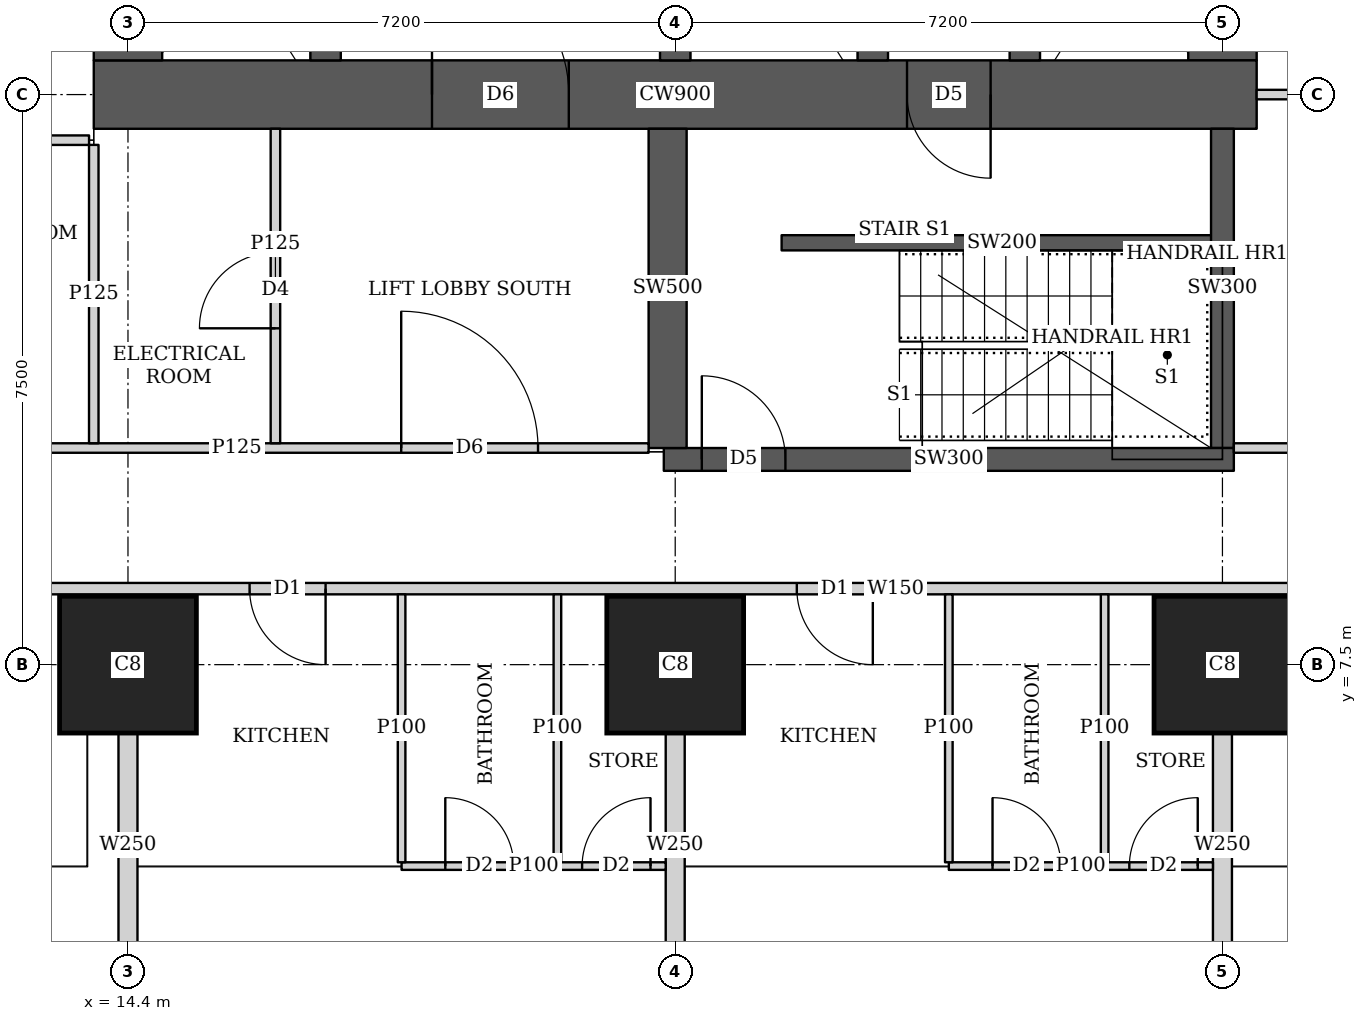
"""IFC4 building model, lengths in metres.
Left out: names, types, materials, properties, quantities, classifications, styles, units other than length and angle.
Written with IfcOpenShell. Run it as: python <this file> out.ifc"""

import sys

from ifc_helpers import new_model, si_unit, direction, frame, frame_2d, origin, origin_2d, place, context, subcontext, project, spatial, rectangle, extrude, element, fill, save


model = new_model("IFC4")
c1 = context("Model", 3, precision=1e-05, world=origin(), true_north=direction((0.0, 1.0)))
c2 = subcontext(c1, "Body", "Model", "MODEL_VIEW")
j1 = project(units=[si_unit("LENGTHUNIT", "METRE"), si_unit("PLANEANGLEUNIT", "RADIAN")], contexts=[c1])
p1 = place(None, origin())
s1 = spatial("IfcSite", under=j1, at=p1, CompositionType="ELEMENT")
p2 = place(p1, origin())
s2 = spatial("IfcBuilding", under=s1, at=p2, CompositionType="ELEMENT")
p3 = place(p2, frame((0.0, 0.0, 42.5)))
s3 = spatial("IfcBuildingStorey", under=s2, at=p3, CompositionType="ELEMENT", Elevation=42.5)
for number, where, z_axis, x_axis in (
    (1, (14.4, 7.5, 0.0), (0.0, 0.0, 1.0), (1.0, 0.0, 0.0)),
    (2, (21.6, 7.5, 0.0), (0.0, 0.0, 1.0), (1.0, 0.0, 0.0)),
    (3, (28.8, 7.5, 0.0), (0.0, 0.0, 1.0), (1.0, 0.0, 0.0)),
):
    element("IfcColumn", number, at=place(p3, frame(where, z_axis=z_axis, x_axis=x_axis)), inside=s3, PredefinedType="COLUMN", context=c2, shape_type="SweptSolid", body=[
        extrude(rectangle(XDim=1.8, YDim=1.8, at=origin_2d()), origin(), (0.0, 0.0, 1.0), 3.75),
    ])
p4 = place(p3, frame((13.95, 15.0, 0.0), z_axis=(0.0, 0.0, 1.0), x_axis=(1.0, 0.0, 0.0)))
e4 = element("IfcWall", 4, at=p4, inside=s3, PredefinedType="SHEAR", context=c2, shape_type="SweptSolid", body=[
    extrude(rectangle(XDim=15.3, YDim=0.9, at=frame_2d((7.65, 0.0))), origin(), (0.0, 0.0, 1.0), 3.75),
])
p5 = place(p4, frame((4.45, 0.0, 0.0)))
e5 = element("IfcOpeningElement", 5, at=p5, cuts=e4, PredefinedType="OPENING", context=c2, shape_type="SweptSolid", body=[
    extrude(rectangle(XDim=1.8, YDim=2.1, at=frame_2d((0.9, 1.05))), frame((0.0, 0.46, 0.0), z_axis=(0.0, -1.0, 0.0), x_axis=(1.0, 0.0, 0.0)), (0.0, 0.0, 1.0), 0.92),
])
p6 = place(p4, frame((10.7, 0.0, 0.0)))
e6 = element("IfcOpeningElement", 6, at=p6, cuts=e4, PredefinedType="OPENING", context=c2, shape_type="SweptSolid", body=[
    extrude(rectangle(XDim=1.1, YDim=2.1, at=frame_2d((0.55, 1.05))), frame((0.0, 0.46, 0.0), z_axis=(0.0, -1.0, 0.0), x_axis=(1.0, 0.0, 0.0)), (0.0, 0.0, 1.0), 0.92),
])
for number, where, z_axis, x_axis in (
    (7, (14.4, 15.45, 0.0), (0.0, 0.0, 1.0), (0.0, 1.0, 0.0)),
    (8, (28.8, 15.45, 0.0), (0.0, 0.0, 1.0), (0.0, 1.0, 0.0)),
):
    element("IfcWall", number, at=place(p3, frame(where, z_axis=z_axis, x_axis=x_axis)), inside=s3, PredefinedType="SHEAR", context=c2, shape_type="SweptSolid", body=[
        extrude(rectangle(XDim=14.1, YDim=0.9, at=frame_2d((7.05, 0.0))), origin(), (0.0, 0.0, 1.0), 3.75),
    ])
p7 = place(p3, frame((17.0, 15.45, 0.0), z_axis=(0.0, 0.0, 1.0), x_axis=(0.0, 1.0, 0.0)))
e9 = element("IfcWall", 9, at=p7, inside=s3, PredefinedType="SHEAR", context=c2, shape_type="SweptSolid", body=[
    extrude(rectangle(XDim=14.1, YDim=0.4, at=frame_2d((7.05, 0.0))), origin(), (0.0, 0.0, 1.0), 3.75),
])
p8 = place(p7, frame((0.875, 0.0, 0.0)))
e10 = element("IfcOpeningElement", 10, at=p8, cuts=e9, PredefinedType="OPENING", context=c2, shape_type="SweptSolid", body=[
    extrude(rectangle(XDim=1.1, YDim=2.1, at=frame_2d((0.55, 1.05))), frame((0.0, 0.21, 0.0), z_axis=(0.0, -1.0, 0.0), x_axis=(1.0, 0.0, 0.0)), (0.0, 0.0, 1.0), 0.42),
])
p9 = place(p7, frame((4.625, 0.0, 0.0)))
e11 = element("IfcOpeningElement", 11, at=p9, cuts=e9, PredefinedType="OPENING", context=c2, shape_type="SweptSolid", body=[
    extrude(rectangle(XDim=1.1, YDim=2.1, at=frame_2d((0.55, 1.05))), frame((0.0, 0.21, 0.0), z_axis=(0.0, -1.0, 0.0), x_axis=(1.0, 0.0, 0.0)), (0.0, 0.0, 1.0), 0.42),
])
p10 = place(p7, frame((8.375, 0.0, 0.0)))
e12 = element("IfcOpeningElement", 12, at=p10, cuts=e9, PredefinedType="OPENING", context=c2, shape_type="SweptSolid", body=[
    extrude(rectangle(XDim=1.1, YDim=2.1, at=frame_2d((0.55, 1.05))), frame((0.0, 0.21, 0.0), z_axis=(0.0, -1.0, 0.0), x_axis=(1.0, 0.0, 0.0)), (0.0, 0.0, 1.0), 0.42),
])
p11 = place(p7, frame((12.125, 0.0, 0.0)))
e13 = element("IfcOpeningElement", 13, at=p11, cuts=e9, PredefinedType="OPENING", context=c2, shape_type="SweptSolid", body=[
    extrude(rectangle(XDim=1.1, YDim=2.1, at=frame_2d((0.55, 1.05))), frame((0.0, 0.21, 0.0), z_axis=(0.0, -1.0, 0.0), x_axis=(1.0, 0.0, 0.0)), (0.0, 0.0, 1.0), 0.42),
])
for number, where, z_axis, x_axis in (
    (14, (21.6, 15.45, 0.0), (0.0, 0.0, 1.0), (0.0, 1.0, 0.0)),
    (15, (24.2, 15.45, 0.0), (0.0, 0.0, 1.0), (0.0, 1.0, 0.0)),
):
    element("IfcWall", number, at=place(p3, frame(where, z_axis=z_axis, x_axis=x_axis)), inside=s3, PredefinedType="SHEAR", context=c2, shape_type="SweptSolid", body=[
        extrude(rectangle(XDim=14.1, YDim=0.4, at=frame_2d((7.05, 0.0))), origin(), (0.0, 0.0, 1.0), 3.75),
    ])
p12 = place(p3, frame((26.2, 15.45, 0.0), z_axis=(0.0, 0.0, 1.0), x_axis=(0.0, 1.0, 0.0)))
e16 = element("IfcWall", 16, at=p12, inside=s3, PredefinedType="SHEAR", context=c2, shape_type="SweptSolid", body=[
    extrude(rectangle(XDim=3.1, YDim=0.4, at=frame_2d((1.55, 0.0))), origin(), (0.0, 0.0, 1.0), 3.75),
])
p13 = place(p12, frame((0.825, 0.0, 0.0)))
e17 = element("IfcOpeningElement", 17, at=p13, cuts=e16, PredefinedType="OPENING", context=c2, shape_type="SweptSolid", body=[
    extrude(rectangle(XDim=1.2, YDim=2.1, at=frame_2d((0.6, 1.05))), frame((0.0, 0.21, 0.0), z_axis=(0.0, -1.0, 0.0), x_axis=(1.0, 0.0, 0.0)), (0.0, 0.0, 1.0), 0.42),
])
p14 = place(p3, frame((21.45, 10.2, 0.0), z_axis=(0.0, 0.0, 1.0), x_axis=(1.0, 0.0, 0.0)))
e18 = element("IfcWall", 18, at=p14, inside=s3, PredefinedType="SHEAR", context=c2, shape_type="SweptSolid", body=[
    extrude(rectangle(XDim=7.5, YDim=0.3, at=frame_2d((3.75, 0.0))), origin(), (0.0, 0.0, 1.0), 3.75),
])
p15 = place(p14, frame((0.5, 0.0, 0.0)))
e19 = element("IfcOpeningElement", 19, at=p15, cuts=e18, PredefinedType="OPENING", context=c2, shape_type="SweptSolid", body=[
    extrude(rectangle(XDim=1.1, YDim=2.1, at=frame_2d((0.55, 1.05))), frame((0.0, 0.16, 0.0), z_axis=(0.0, -1.0, 0.0), x_axis=(1.0, 0.0, 0.0)), (0.0, 0.0, 1.0), 0.32),
])
p16 = place(p3, frame((21.5, 10.35, 0.0), z_axis=(0.0, 0.0, 1.0), x_axis=(0.0, 1.0, 0.0)))
e20 = element("IfcWall", 20, at=p16, inside=s3, PredefinedType="SHEAR", context=c2, shape_type="SweptSolid", body=[
    extrude(rectangle(XDim=4.2, YDim=0.5, at=frame_2d((2.1, 0.0))), origin(), (0.0, 0.0, 1.0), 3.75),
])
p17 = place(p3, frame((28.8, 10.35, 0.0), z_axis=(0.0, 0.0, 1.0), x_axis=(0.0, 1.0, 0.0)))
e21 = element("IfcWall", 21, at=p17, inside=s3, PredefinedType="SHEAR", context=c2, shape_type="SweptSolid", body=[
    extrude(rectangle(XDim=4.2, YDim=0.3, at=frame_2d((2.1, 0.0))), origin(), (0.0, 0.0, 1.0), 3.75),
])
p18 = place(p3, frame((40.054, 8.5, 0.0), z_axis=(0.0, 0.0, 1.0), x_axis=(-1.0, 0.0, 0.0)))
e22 = element("IfcWall", 22, at=p18, inside=s3, PredefinedType="SOLIDWALL", context=c2, shape_type="SweptSolid", body=[
    extrude(rectangle(XDim=31.704, YDim=0.15, at=frame_2d((15.852, 0.0))), origin(), (0.0, 0.0, 1.0), 3.5),
])
p19 = place(p18, frame((27.321, 0.0, 0.0)))
e23 = element("IfcOpeningElement", 23, at=p19, cuts=e22, PredefinedType="OPENING", context=c2, shape_type="SweptSolid", body=[
    extrude(rectangle(XDim=1.0, YDim=2.1, at=frame_2d((0.5, 1.05))), frame((0.0, 0.085, 0.0), z_axis=(0.0, -1.0, 0.0), x_axis=(1.0, 0.0, 0.0)), (0.0, 0.0, 1.0), 0.17),
])
p20 = place(p18, frame((23.054, 0.0, 0.0)))
e24 = element("IfcOpeningElement", 24, at=p20, cuts=e22, PredefinedType="OPENING", context=c2, shape_type="SweptSolid", body=[
    extrude(rectangle(XDim=1.0, YDim=2.1, at=frame_2d((0.5, 1.05))), frame((0.0, 0.085, 0.0), z_axis=(0.0, -1.0, 0.0), x_axis=(1.0, 0.0, 0.0)), (0.0, 0.0, 1.0), 0.17),
])
p21 = place(p18, frame((15.854, 0.0, 0.0)))
e25 = element("IfcOpeningElement", 25, at=p21, cuts=e22, PredefinedType="OPENING", context=c2, shape_type="SweptSolid", body=[
    extrude(rectangle(XDim=1.0, YDim=2.1, at=frame_2d((0.5, 1.05))), frame((0.0, 0.085, 0.0), z_axis=(0.0, -1.0, 0.0), x_axis=(1.0, 0.0, 0.0)), (0.0, 0.0, 1.0), 0.17),
])
p22 = place(p18, frame((8.654, 0.0, 0.0)))
e26 = element("IfcOpeningElement", 26, at=p22, cuts=e22, PredefinedType="OPENING", context=c2, shape_type="SweptSolid", body=[
    extrude(rectangle(XDim=1.0, YDim=2.1, at=frame_2d((0.5, 1.05))), frame((0.0, 0.085, 0.0), z_axis=(0.0, -1.0, 0.0), x_axis=(1.0, 0.0, 0.0)), (0.0, 0.0, 1.0), 0.17),
])
p23 = place(p18, frame((0.15, 0.0, 0.0)))
e27 = element("IfcOpeningElement", 27, at=p23, cuts=e22, PredefinedType="OPENING", context=c2, shape_type="SweptSolid", body=[
    extrude(rectangle(XDim=1.0, YDim=2.1, at=frame_2d((0.5, 1.05))), frame((0.0, 0.085, 0.0), z_axis=(0.0, -1.0, 0.0), x_axis=(1.0, 0.0, 0.0)), (0.0, 0.0, 1.0), 0.17),
])
p24 = place(p3, frame((21.475, 4.85, 0.0), z_axis=(0.0, 0.0, 1.0), x_axis=(-1.0, 0.0, 0.0)))
e28 = element("IfcWall", 28, at=p24, inside=s3, PredefinedType="PARTITIONING", context=c2, shape_type="SweptSolid", body=[
    extrude(rectangle(XDim=3.475, YDim=0.1, at=frame_2d((1.738, 0.0))), origin(), (0.0, 0.0, 1.0), 3.5),
])
p25 = place(p24, frame((2.0, 0.0, 0.0)))
e29 = element("IfcOpeningElement", 29, at=p25, cuts=e28, PredefinedType="OPENING", context=c2, shape_type="SweptSolid", body=[
    extrude(rectangle(XDim=0.9, YDim=2.1, at=frame_2d((0.45, 1.05))), frame((0.0, 0.06, 0.0), z_axis=(0.0, -1.0, 0.0), x_axis=(1.0, 0.0, 0.0)), (0.0, 0.0, 1.0), 0.12),
])
p26 = place(p24, frame((0.2, 0.0, 0.0)))
e30 = element("IfcOpeningElement", 30, at=p26, cuts=e28, PredefinedType="OPENING", context=c2, shape_type="SweptSolid", body=[
    extrude(rectangle(XDim=0.9, YDim=2.1, at=frame_2d((0.45, 1.05))), frame((0.0, 0.06, 0.0), z_axis=(0.0, -1.0, 0.0), x_axis=(1.0, 0.0, 0.0)), (0.0, 0.0, 1.0), 0.12),
])
for number, where, z_axis, x_axis in (
    (31, (18.0, 4.9, 0.0), (0.0, 0.0, 1.0), (0.0, 1.0, 0.0)),
    (32, (20.05, 4.9, 0.0), (0.0, 0.0, 1.0), (0.0, 1.0, 0.0)),
):
    element("IfcWall", number, at=place(p3, frame(where, z_axis=z_axis, x_axis=x_axis)), inside=s3, PredefinedType="PARTITIONING", context=c2, shape_type="SweptSolid", body=[
        extrude(rectangle(XDim=3.525, YDim=0.1, at=frame_2d((1.763, 0.0))), origin(), (0.0, 0.0, 1.0), 3.5),
    ])
p27 = place(p3, frame((14.4, 3.65, 0.0), z_axis=(0.0, 0.0, 1.0), x_axis=(0.0, 1.0, 0.0)))
e33 = element("IfcWall", 33, at=p27, inside=s3, PredefinedType="SOLIDWALL", context=c2, shape_type="SweptSolid", body=[
    extrude(rectangle(XDim=2.949, YDim=0.25, at=frame_2d((1.475, 0.0))), origin(), (0.0, 0.0, 1.0), 3.5),
])
p28 = place(p3, frame((28.675, 4.85, 0.0), z_axis=(0.0, 0.0, 1.0), x_axis=(-1.0, 0.0, 0.0)))
e34 = element("IfcWall", 34, at=p28, inside=s3, PredefinedType="PARTITIONING", context=c2, shape_type="SweptSolid", body=[
    extrude(rectangle(XDim=3.475, YDim=0.1, at=frame_2d((1.738, 0.0))), origin(), (0.0, 0.0, 1.0), 3.5),
])
p29 = place(p28, frame((2.0, 0.0, 0.0)))
e35 = element("IfcOpeningElement", 35, at=p29, cuts=e34, PredefinedType="OPENING", context=c2, shape_type="SweptSolid", body=[
    extrude(rectangle(XDim=0.9, YDim=2.1, at=frame_2d((0.45, 1.05))), frame((0.0, 0.06, 0.0), z_axis=(0.0, -1.0, 0.0), x_axis=(1.0, 0.0, 0.0)), (0.0, 0.0, 1.0), 0.12),
])
p30 = place(p28, frame((0.2, 0.0, 0.0)))
e36 = element("IfcOpeningElement", 36, at=p30, cuts=e34, PredefinedType="OPENING", context=c2, shape_type="SweptSolid", body=[
    extrude(rectangle(XDim=0.9, YDim=2.1, at=frame_2d((0.45, 1.05))), frame((0.0, 0.06, 0.0), z_axis=(0.0, -1.0, 0.0), x_axis=(1.0, 0.0, 0.0)), (0.0, 0.0, 1.0), 0.12),
])
for number, where, z_axis, x_axis in (
    (37, (25.2, 4.9, 0.0), (0.0, 0.0, 1.0), (0.0, 1.0, 0.0)),
    (38, (27.25, 4.9, 0.0), (0.0, 0.0, 1.0), (0.0, 1.0, 0.0)),
):
    element("IfcWall", number, at=place(p3, frame(where, z_axis=z_axis, x_axis=x_axis)), inside=s3, PredefinedType="PARTITIONING", context=c2, shape_type="SweptSolid", body=[
        extrude(rectangle(XDim=3.525, YDim=0.1, at=frame_2d((1.763, 0.0))), origin(), (0.0, 0.0, 1.0), 3.5),
    ])
for number, where, z_axis, x_axis in (
    (39, (21.6, 3.65, 0.0), (0.0, 0.0, 1.0), (0.0, 1.0, 0.0)),
    (40, (28.8, 3.65, 0.0), (0.0, 0.0, 1.0), (0.0, 1.0, 0.0)),
):
    element("IfcWall", number, at=place(p3, frame(where, z_axis=z_axis, x_axis=x_axis)), inside=s3, PredefinedType="SOLIDWALL", context=c2, shape_type="SweptSolid", body=[
        extrude(rectangle(XDim=2.949, YDim=0.25, at=frame_2d((1.475, 0.0))), origin(), (0.0, 0.0, 1.0), 3.5),
    ])
p31 = place(p3, frame((10.413, 14.4, 0.0), z_axis=(0.0, 0.0, 1.0), x_axis=(1.0, 0.0, 0.0)))
e41 = element("IfcWall", 41, at=p31, inside=s3, PredefinedType="PARTITIONING", context=c2, shape_type="SweptSolid", body=[
    extrude(rectangle(XDim=3.475, YDim=0.125, at=frame_2d((1.737, 0.0))), origin(), (0.0, 0.0, 1.0), 3.5),
])
p32 = place(p3, frame((13.95, 10.413, 0.0), z_axis=(0.0, 0.0, 1.0), x_axis=(0.0, 1.0, 0.0)))
e42 = element("IfcWall", 42, at=p32, inside=s3, PredefinedType="PARTITIONING", context=c2, shape_type="SweptSolid", body=[
    extrude(rectangle(XDim=3.925, YDim=0.125, at=frame_2d((1.962, 0.0))), origin(), (0.0, 0.0, 1.0), 3.5),
])
p33 = place(p3, frame((10.413, 10.35, 0.0), z_axis=(0.0, 0.0, 1.0), x_axis=(1.0, 0.0, 0.0)))
e43 = element("IfcWall", 43, at=p33, inside=s3, PredefinedType="PARTITIONING", context=c2, shape_type="SweptSolid", body=[
    extrude(rectangle(XDim=10.837, YDim=0.125, at=frame_2d((5.418, 0.0))), origin(), (0.0, 0.0, 1.0), 3.5),
])
p34 = place(p33, frame((7.582, 0.0, 0.0)))
e44 = element("IfcOpeningElement", 44, at=p34, cuts=e43, PredefinedType="OPENING", context=c2, shape_type="SweptSolid", body=[
    extrude(rectangle(XDim=1.8, YDim=2.1, at=frame_2d((0.9, 1.05))), frame((0.0, 0.073, 0.0), z_axis=(0.0, -1.0, 0.0), x_axis=(1.0, 0.0, 0.0)), (0.0, 0.0, 1.0), 0.145),
])
p35 = place(p3, frame((16.34, 10.413, 0.0), z_axis=(0.0, 0.0, 1.0), x_axis=(0.0, 1.0, 0.0)))
e45 = element("IfcWall", 45, at=p35, inside=s3, PredefinedType="PARTITIONING", context=c2, shape_type="SweptSolid", body=[
    extrude(rectangle(XDim=4.137, YDim=0.125, at=frame_2d((2.068, 0.0))), origin(), (0.0, 0.0, 1.0), 3.5),
])
p36 = place(p35, frame((1.512, 0.0, 0.0)))
e46 = element("IfcOpeningElement", 46, at=p36, cuts=e45, PredefinedType="OPENING", context=c2, shape_type="SweptSolid", body=[
    extrude(rectangle(XDim=1.0, YDim=2.1, at=frame_2d((0.5, 1.05))), frame((0.0, 0.073, 0.0), z_axis=(0.0, -1.0, 0.0), x_axis=(1.0, 0.0, 0.0)), (0.0, 0.0, 1.0), 0.145),
])
p37 = place(p3, frame((28.95, 10.35, 0.0), z_axis=(0.0, 0.0, 1.0), x_axis=(1.0, 0.0, 0.0)))
e47 = element("IfcWall", 47, at=p37, inside=s3, PredefinedType="PARTITIONING", context=c2, shape_type="SweptSolid", body=[
    extrude(rectangle(XDim=8.886, YDim=0.125, at=frame_2d((4.443, 0.0))), origin(), (0.0, 0.0, 1.0), 3.5),
])
p38 = place(p3, frame((29.25, 15.0, 0.0), z_axis=(0.0, 0.0, 1.0), x_axis=(1.0, 0.0, 0.0)))
e48 = element("IfcWall", 48, at=p38, inside=s3, PredefinedType="PARTITIONING", context=c2, shape_type="SweptSolid", body=[
    extrude(rectangle(XDim=5.849, YDim=0.125, at=frame_2d((2.925, 0.0))), origin(), (0.0, 0.0, 1.0), 3.5),
])
p39 = place(p3, frame((23.0, 13.05, 0.0), z_axis=(0.0, 0.0, 1.0), x_axis=(1.0, 0.0, 0.0)))
e49 = element("IfcWall", 49, at=p39, inside=s3, PredefinedType="SHEAR", context=c2, shape_type="SweptSolid", body=[
    extrude(rectangle(XDim=5.8, YDim=0.2, at=frame_2d((2.9, 0.0))), origin(), (0.0, 0.0, 1.0), 3.75),
])
p40 = place(p25, origin())
e50 = element("IfcDoor", 50, at=p40, inside=s3, OperationType="SINGLE_SWING_LEFT", PredefinedType="DOOR", context=c2, shape_type="SweptSolid", body=[
    extrude(rectangle(XDim=0.9, YDim=2.1, at=frame_2d((0.45, 1.05))), frame((0.0, 0.025, 0.0), z_axis=(0.0, -1.0, 0.0), x_axis=(1.0, 0.0, 0.0)), (0.0, 0.0, 1.0), 0.05),
])
fill(e29, e50)
p41 = place(p26, origin())
e51 = element("IfcDoor", 51, at=p41, inside=s3, OperationType="SINGLE_SWING_RIGHT", PredefinedType="DOOR", context=c2, shape_type="SweptSolid", body=[
    extrude(rectangle(XDim=0.9, YDim=2.1, at=frame_2d((0.45, 1.05))), frame((0.0, 0.025, 0.0), z_axis=(0.0, -1.0, 0.0), x_axis=(1.0, 0.0, 0.0)), (0.0, 0.0, 1.0), 0.05),
])
fill(e30, e51)
p42 = place(p20, origin())
e52 = element("IfcDoor", 52, at=p42, inside=s3, OperationType="SINGLE_SWING_LEFT", PredefinedType="DOOR", context=c2, shape_type="SweptSolid", body=[
    extrude(rectangle(XDim=1.0, YDim=2.1, at=frame_2d((0.5, 1.05))), frame((0.0, 0.025, 0.0), z_axis=(0.0, -1.0, 0.0), x_axis=(1.0, 0.0, 0.0)), (0.0, 0.0, 1.0), 0.05),
])
fill(e24, e52)
p43 = place(p29, origin())
e53 = element("IfcDoor", 53, at=p43, inside=s3, OperationType="SINGLE_SWING_LEFT", PredefinedType="DOOR", context=c2, shape_type="SweptSolid", body=[
    extrude(rectangle(XDim=0.9, YDim=2.1, at=frame_2d((0.45, 1.05))), frame((0.0, 0.025, 0.0), z_axis=(0.0, -1.0, 0.0), x_axis=(1.0, 0.0, 0.0)), (0.0, 0.0, 1.0), 0.05),
])
fill(e35, e53)
p44 = place(p30, origin())
e54 = element("IfcDoor", 54, at=p44, inside=s3, OperationType="SINGLE_SWING_RIGHT", PredefinedType="DOOR", context=c2, shape_type="SweptSolid", body=[
    extrude(rectangle(XDim=0.9, YDim=2.1, at=frame_2d((0.45, 1.05))), frame((0.0, 0.025, 0.0), z_axis=(0.0, -1.0, 0.0), x_axis=(1.0, 0.0, 0.0)), (0.0, 0.0, 1.0), 0.05),
])
fill(e36, e54)
p45 = place(p21, origin())
e55 = element("IfcDoor", 55, at=p45, inside=s3, OperationType="SINGLE_SWING_LEFT", PredefinedType="DOOR", context=c2, shape_type="SweptSolid", body=[
    extrude(rectangle(XDim=1.0, YDim=2.1, at=frame_2d((0.5, 1.05))), frame((0.0, 0.025, 0.0), z_axis=(0.0, -1.0, 0.0), x_axis=(1.0, 0.0, 0.0)), (0.0, 0.0, 1.0), 0.05),
])
fill(e25, e55)
p46 = place(p36, origin())
e56 = element("IfcDoor", 56, at=p46, inside=s3, OperationType="SINGLE_SWING_LEFT", PredefinedType="DOOR", context=c2, shape_type="SweptSolid", body=[
    extrude(rectangle(XDim=1.0, YDim=2.1, at=frame_2d((0.5, 1.05))), frame((0.0, 0.025, 0.0), z_axis=(0.0, -1.0, 0.0), x_axis=(1.0, 0.0, 0.0)), (0.0, 0.0, 1.0), 0.05),
])
fill(e46, e56)
p47 = place(p34, origin())
e57 = element("IfcDoor", 57, at=p47, inside=s3, OperationType="DOUBLE_DOOR_SINGLE_SWING", PredefinedType="DOOR", context=c2, shape_type="SweptSolid", body=[
    extrude(rectangle(XDim=1.8, YDim=2.1, at=frame_2d((0.9, 1.05))), frame((0.0, 0.025, 0.0), z_axis=(0.0, -1.0, 0.0), x_axis=(1.0, 0.0, 0.0)), (0.0, 0.0, 1.0), 0.05),
])
fill(e44, e57)
p48 = place(p5, origin())
e58 = element("IfcDoor", 58, at=p48, inside=s3, OperationType="DOUBLE_DOOR_SINGLE_SWING", PredefinedType="DOOR", context=c2, shape_type="SweptSolid", body=[
    extrude(rectangle(XDim=1.8, YDim=2.1, at=frame_2d((0.9, 1.05))), frame((0.0, 0.025, 0.0), z_axis=(0.0, -1.0, 0.0), x_axis=(1.0, 0.0, 0.0)), (0.0, 0.0, 1.0), 0.05),
])
fill(e5, e58)
p49 = place(p6, origin())
e59 = element("IfcDoor", 59, at=p49, inside=s3, OperationType="SINGLE_SWING_LEFT", PredefinedType="DOOR", context=c2, shape_type="SweptSolid", body=[
    extrude(rectangle(XDim=1.1, YDim=2.1, at=frame_2d((0.55, 1.05))), frame((0.0, 0.025, 0.0), z_axis=(0.0, -1.0, 0.0), x_axis=(1.0, 0.0, 0.0)), (0.0, 0.0, 1.0), 0.05),
])
fill(e6, e59)
p50 = place(p15, origin())
e60 = element("IfcDoor", 60, at=p50, inside=s3, OperationType="SINGLE_SWING_LEFT", PredefinedType="DOOR", context=c2, shape_type="SweptSolid", body=[
    extrude(rectangle(XDim=1.1, YDim=2.1, at=frame_2d((0.55, 1.05))), frame((0.0, 0.025, 0.0), z_axis=(0.0, -1.0, 0.0), x_axis=(1.0, 0.0, 0.0)), (0.0, 0.0, 1.0), 0.05),
])
fill(e19, e60)
save(model, sys.argv[1])
